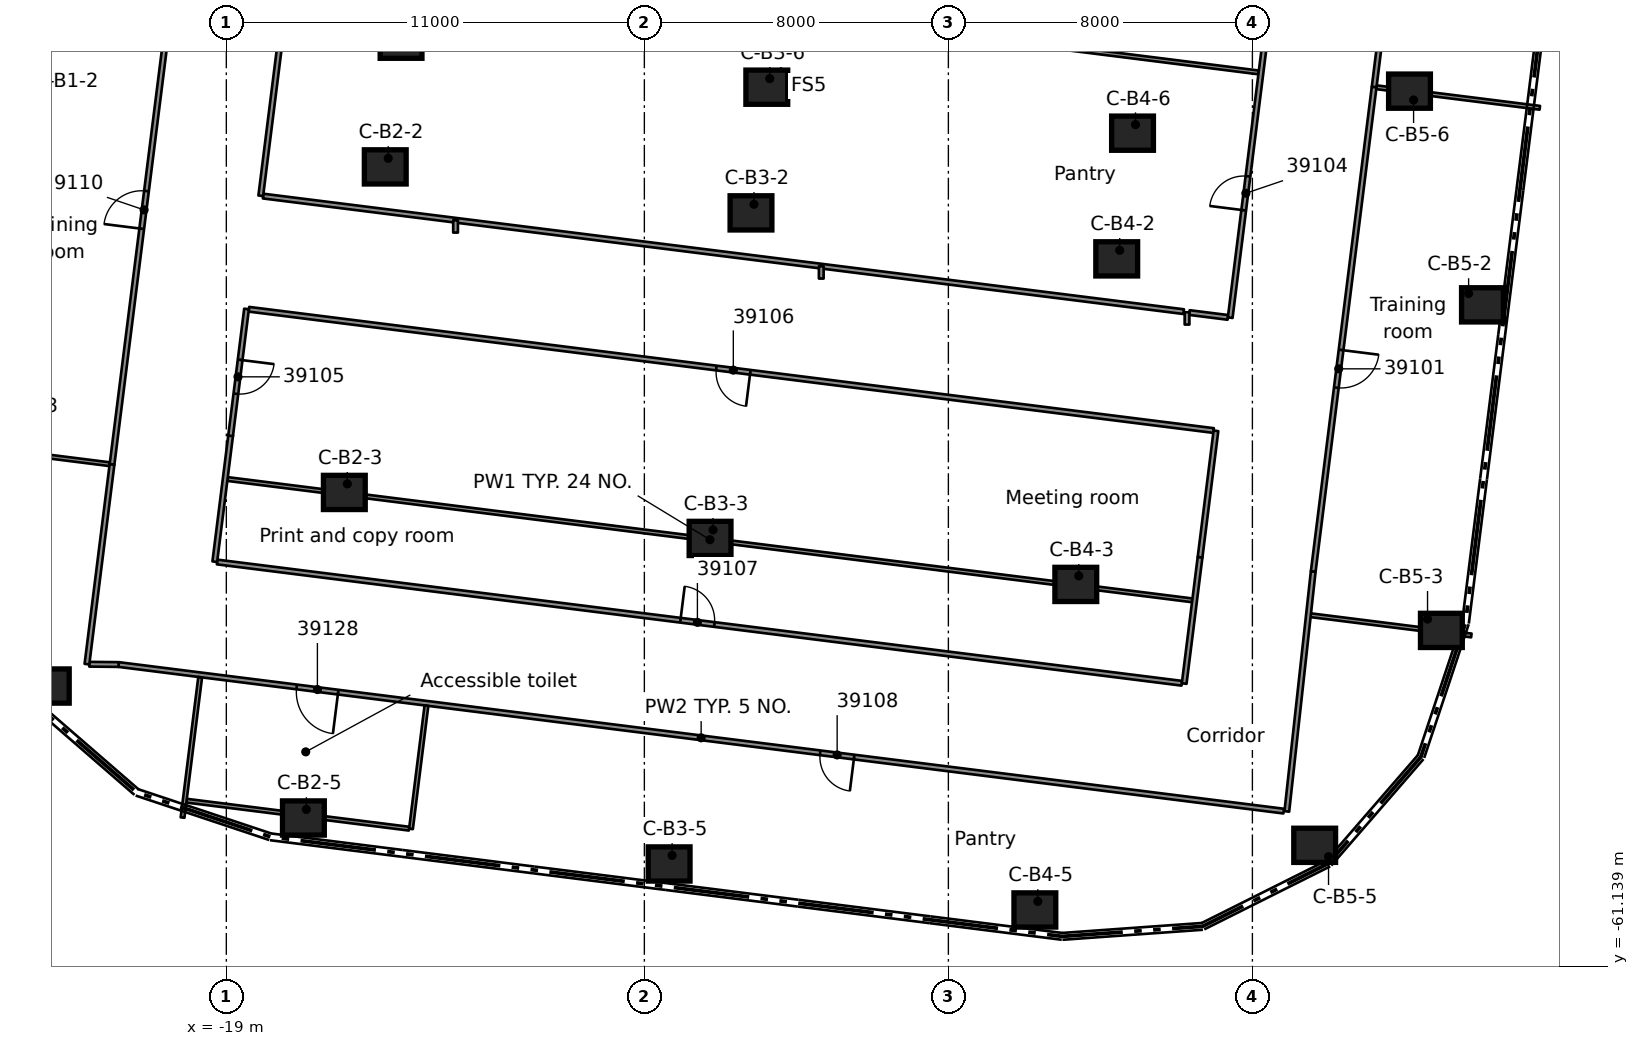
"""IFC4 building model, lengths in metres.
Left out: names, types, materials, properties, quantities, classifications, styles, units other than length and angle.
Written with IfcOpenShell. Run it as: python <this file> out.ifc"""

import sys

from ifc_helpers import new_model, si_unit, direction, frame, frame_2d, origin, origin_2d, place, context, subcontext, project, spatial, rectangle, extrude, element, fill, save


model = new_model("IFC4")
c1 = context("Model", 3, precision=1e-05, world=origin(), true_north=direction((0.0, 1.0)))
c2 = subcontext(c1, "Body", "Model", "MODEL_VIEW")
j1 = project(units=[si_unit("LENGTHUNIT", "METRE"), si_unit("PLANEANGLEUNIT", "RADIAN")], contexts=[c1])
p1 = place(None, origin())
s1 = spatial("IfcSite", under=j1, at=p1, CompositionType="ELEMENT")
p2 = place(p1, origin())
s2 = spatial("IfcBuilding", under=s1, at=p2, CompositionType="ELEMENT")
p3 = place(p2, frame((0.0, 0.0, 192.1)))
s3 = spatial("IfcBuildingStorey", under=s2, at=p3, CompositionType="ELEMENT", Elevation=192.1)
for number, where, z_axis, x_axis in (
    (1, (-23.685, -53.758, 0.0), (0.0, 0.0, 1.0), (1.0, 0.0, 0.0)),
    (2, (-14.818, -40.098, 0.0), (0.0, 0.0, 1.0), (1.0, 0.0, 0.0)),
    (3, (-15.895, -48.664, 0.0), (0.0, 0.0, 1.0), (1.0, 0.0, 0.0)),
    (4, (-16.972, -57.23, 0.0), (0.0, 0.0, 1.0), (1.0, 0.0, 0.0)),
    (5, (-14.402, -36.791, 0.0), (0.0, 0.0, 1.0), (1.0, 0.0, 0.0)),
    (6, (-5.194, -41.308, 0.0), (0.0, 0.0, 1.0), (1.0, 0.0, 0.0)),
    (7, (-6.271, -49.874, 0.0), (0.0, 0.0, 1.0), (1.0, 0.0, 0.0)),
    (8, (-7.348, -58.44, 0.0), (0.0, 0.0, 1.0), (1.0, 0.0, 0.0)),
    (9, (-4.778, -38.001, 0.0), (0.0, 0.0, 1.0), (1.0, 0.0, 0.0)),
    (10, (4.43, -42.518, 0.0), (0.0, 0.0, 1.0), (1.0, 0.0, 0.0)),
    (11, (3.353, -51.084, 0.0), (0.0, 0.0, 1.0), (1.0, 0.0, 0.0)),
    (12, (2.276, -59.65, 0.0), (0.0, 0.0, 1.0), (1.0, 0.0, 0.0)),
    (13, (4.846, -39.211, 0.0), (0.0, 0.0, 1.0), (1.0, 0.0, 0.0)),
    (14, (14.054, -43.728, 0.0), (0.0, 0.0, 1.0), (1.0, 0.0, 0.0)),
    (15, (12.973, -52.294, 0.0), (0.0, 0.0, 1.0), (1.0, 0.0, 0.0)),
    (16, (9.639, -57.949, 0.0), (0.0, 0.0, 1.0), (1.0, 0.0, 0.0)),
    (17, (12.134, -38.105, 0.0), (0.0, 0.0, 1.0), (1.0, 0.0, 0.0)),
):
    element("IfcColumn", number, at=place(p3, frame(where, z_axis=z_axis, x_axis=x_axis)), inside=s3, PredefinedType="COLUMN", context=c2, shape_type="SweptSolid", body=[
        extrude(rectangle(XDim=1.1, YDim=0.9, at=origin_2d()), origin(), (0.0, 0.0, 1.0), 3.5),
    ])
p4 = place(p3, frame((-20.045, -56.775, 0.0), z_axis=(0.0, 0.0, 1.0), x_axis=(0.992184639026, -0.124778371847, 0.0)))
e18 = element("IfcWall", 18, at=p4, inside=s3, PredefinedType="PARTITIONING", context=c2, shape_type="SweptSolid", body=[
    extrude(rectangle(XDim=5.899, YDim=0.1, at=frame_2d((2.95, 0.0))), origin(), (0.0, 0.0, 1.0), 3.06),
])
p5 = place(p3, frame((8.823, -57.049, 0.0), z_axis=(0.0, 0.0, 1.0), x_axis=(-0.992177755652, 0.124833093322, 0.0)))
e19 = element("IfcWall", 19, at=p5, inside=s3, PredefinedType="PARTITIONING", context=c2, shape_type="SweptSolid", body=[
    extrude(rectangle(XDim=30.899, YDim=0.125, at=frame_2d((15.449, 0.0))), origin(), (0.0, 0.0, 1.0), 3.06),
])
p6 = place(p5, frame((11.392, 0.0, 0.0)))
e20 = element("IfcOpeningElement", 20, at=p6, cuts=e19, PredefinedType="OPENING", context=c2, shape_type="SweptSolid", body=[
    extrude(rectangle(XDim=0.9, YDim=2.1, at=frame_2d((0.45, 1.05))), frame((0.0, 0.073, 0.0), z_axis=(0.0, -1.0, 0.0), x_axis=(1.0, 0.0, 0.0)), (0.0, 0.0, 1.0), 0.145),
])
p7 = place(p5, frame((25.077, 0.0, 0.0)))
e21 = element("IfcOpeningElement", 21, at=p7, cuts=e19, PredefinedType="OPENING", context=c2, shape_type="SweptSolid", body=[
    extrude(rectangle(XDim=1.1, YDim=2.1, at=frame_2d((0.55, 1.05))), frame((0.0, 0.073, 0.0), z_axis=(0.0, -1.0, 0.0), x_axis=(1.0, 0.0, 0.0)), (0.0, 0.0, 1.0), 0.145),
])
p8 = place(p3, frame((-19.242, -50.494, 0.0), z_axis=(0.0, 0.0, 1.0), x_axis=(0.992190871449, -0.124728804262, 0.0)))
e22 = element("IfcWall", 22, at=p8, inside=s3, PredefinedType="PARTITIONING", context=c2, shape_type="SweptSolid", body=[
    extrude(rectangle(XDim=25.585, YDim=0.125, at=frame_2d((12.792, 0.0))), origin(), (0.0, 0.0, 1.0), 3.06),
])
p9 = place(p8, frame((12.288, 0.0, 0.0)))
e23 = element("IfcOpeningElement", 23, at=p9, cuts=e22, PredefinedType="OPENING", context=c2, shape_type="SweptSolid", body=[
    extrude(rectangle(XDim=0.9, YDim=2.1, at=frame_2d((0.45, 1.05))), frame((0.0, 0.073, 0.0), z_axis=(0.0, -1.0, 0.0), x_axis=(1.0, 0.0, 0.0)), (0.0, 0.0, 1.0), 0.145),
])
p10 = place(p3, frame((-26.313, -47.387, 0.0), z_axis=(0.0, 0.0, 1.0), x_axis=(0.992174773364, -0.124856794369, 0.0)))
e24 = element("IfcWall", 24, at=p10, inside=s3, PredefinedType="PARTITIONING", context=c2, shape_type="SweptSolid", body=[
    extrude(rectangle(XDim=4.276, YDim=0.1, at=frame_2d((2.138, 0.0))), origin(), (0.0, 0.0, 1.0), 3.06),
])
p11 = place(p3, frame((-18.968, -48.311, 0.0), z_axis=(0.0, 0.0, 1.0), x_axis=(0.992187328306, -0.124756985971, 0.0)))
e25 = element("IfcWall", 25, at=p11, inside=s3, PredefinedType="PARTITIONING", context=c2, shape_type="SweptSolid", body=[
    extrude(rectangle(XDim=25.585, YDim=0.1, at=frame_2d((12.792, 0.0))), origin(), (0.0, 0.0, 1.0), 3.06),
])
p12 = place(p3, frame((9.519, -51.893, 0.0), z_axis=(0.0, 0.0, 1.0), x_axis=(0.992174773364, -0.124856794369, 0.0)))
e26 = element("IfcWall", 26, at=p12, inside=s3, PredefinedType="PARTITIONING", context=c2, shape_type="SweptSolid", body=[
    extrude(rectangle(XDim=4.276, YDim=0.1, at=frame_2d((2.138, 0.0))), origin(), (0.0, 0.0, 1.0), 3.06),
])
p13 = place(p3, frame((6.979, -47.035, 0.0), z_axis=(0.0, 0.0, 1.0), x_axis=(-0.992192052325, 0.124719410292, 0.0)))
e27 = element("IfcWall", 27, at=p13, inside=s3, PredefinedType="PARTITIONING", context=c2, shape_type="SweptSolid", body=[
    extrude(rectangle(XDim=25.585, YDim=0.125, at=frame_2d((12.792, 0.0))), origin(), (0.0, 0.0, 1.0), 3.06),
])
p14 = place(p13, frame((12.288, 0.0, 0.0)))
e28 = element("IfcOpeningElement", 28, at=p14, cuts=e27, PredefinedType="OPENING", context=c2, shape_type="SweptSolid", body=[
    extrude(rectangle(XDim=0.9, YDim=2.1, at=frame_2d((0.45, 1.05))), frame((0.0, 0.073, 0.0), z_axis=(0.0, -1.0, 0.0), x_axis=(1.0, 0.0, 0.0)), (0.0, 0.0, 1.0), 0.145),
])
p15 = place(p3, frame((-18.032, -40.866, 0.0), z_axis=(0.0, 0.0, 1.0), x_axis=(0.9922120451, -0.124560256738, 0.0)))
e29 = element("IfcWall", 29, at=p15, inside=s3, PredefinedType="PARTITIONING", context=c2, shape_type="SweptSolid", body=[
    extrude(rectangle(XDim=24.414, YDim=0.125, at=frame_2d((12.207, 0.0))), origin(), (0.0, 0.0, 1.0), 3.06),
])
p16 = place(p3, frame((6.342, -43.931, 0.0), z_axis=(0.0, 0.0, 1.0), x_axis=(0.992192944833, -0.124712309833, 0.0)))
e30 = element("IfcWall", 30, at=p16, inside=s3, PredefinedType="PARTITIONING", context=c2, shape_type="SweptSolid", body=[
    extrude(rectangle(XDim=1.02, YDim=0.125, at=frame_2d((0.51, 0.0))), origin(), (0.0, 0.0, 1.0), 3.06),
])
p17 = place(p3, frame((-17.221, -34.421, 0.0), z_axis=(0.0, 0.0, 1.0), x_axis=(0.992190871449, -0.124728804262, 0.0)))
e31 = element("IfcWall", 31, at=p17, inside=s3, PredefinedType="PARTITIONING", context=c2, shape_type="SweptSolid", body=[
    extrude(rectangle(XDim=25.585, YDim=0.1, at=frame_2d((12.792, 0.0))), origin(), (0.0, 0.0, 1.0), 3.06),
])
p18 = place(p3, frame((11.266, -38.003, 0.0), z_axis=(0.0, 0.0, 1.0), x_axis=(0.992194392082, -0.124700795187, 0.0)))
e32 = element("IfcWall", 32, at=p18, inside=s3, PredefinedType="PARTITIONING", context=c2, shape_type="SweptSolid", body=[
    extrude(rectangle(XDim=4.331, YDim=0.1, at=frame_2d((2.165, 0.0))), origin(), (0.0, 0.0, 1.0), 3.06),
])
p19 = place(p3, frame((-22.606, -53.184, 0.0), z_axis=(0.0, 0.0, 1.0), x_axis=(0.999948794941, -0.010119658899, 0.0)))
e33 = element("IfcWall", 33, at=p19, inside=s3, PredefinedType="PARTITIONING", context=c2, shape_type="SweptSolid", body=[
    extrude(rectangle(XDim=0.772, YDim=0.125, at=frame_2d((0.386, 0.0))), origin(), (0.0, 0.0, 1.0), 3.06),
])
p20 = place(p3, frame((9.601, -50.743, 0.0), z_axis=(0.0, 0.0, 1.0), x_axis=(-0.109423264463, -0.993995246062, 0.0)))
e34 = element("IfcWall", 34, at=p20, inside=s3, PredefinedType="PARTITIONING", context=c2, shape_type="SweptSolid", body=[
    extrude(rectangle(XDim=6.352, YDim=0.125, at=frame_2d((3.176, 0.0))), origin(), (0.0, 0.0, 1.0), 3.06),
])
p21 = place(p3, frame((11.204, -37.994, 0.0), z_axis=(0.0, 0.0, 1.0), x_axis=(-0.124754953573, -0.992187583856, 0.0)))
e35 = element("IfcWall", 35, at=p21, inside=s3, PredefinedType="PARTITIONING", context=c2, shape_type="SweptSolid", body=[
    extrude(rectangle(XDim=12.849, YDim=0.125, at=frame_2d((6.425, 0.0))), origin(), (0.0, 0.0, 1.0), 3.06),
])
p22 = place(p21, frame((6.976, 0.0, 0.0)))
e36 = element("IfcOpeningElement", 36, at=p22, cuts=e35, PredefinedType="OPENING", context=c2, shape_type="SweptSolid", body=[
    extrude(rectangle(XDim=1.0, YDim=2.1, at=frame_2d((0.5, 1.05))), frame((0.0, 0.073, 0.0), z_axis=(0.0, -1.0, 0.0), x_axis=(1.0, 0.0, 0.0)), (0.0, 0.0, 1.0), 0.145),
])
p23 = place(p3, frame((6.623, -50.368, 0.0), z_axis=(0.0, 0.0, 1.0), x_axis=(-0.124716116187, -0.992192466391, 0.0)))
e37 = element("IfcWall", 37, at=p23, inside=s3, PredefinedType="PARTITIONING", context=c2, shape_type="SweptSolid", body=[
    extrude(rectangle(XDim=3.351, YDim=0.125, at=frame_2d((1.676, 0.0))), origin(), (0.0, 0.0, 1.0), 3.06),
])
p24 = place(p3, frame((6.623, -50.368, 0.0), z_axis=(0.0, 0.0, 1.0), x_axis=(0.124725131243, 0.992191333179, 0.0)))
e38 = element("IfcWall", 38, at=p24, inside=s3, PredefinedType="PARTITIONING", context=c2, shape_type="SweptSolid", body=[
    extrude(rectangle(XDim=3.351, YDim=0.125, at=frame_2d((1.676, 0.0))), origin(), (0.0, 0.0, 1.0), 3.06),
])
p25 = place(p3, frame((7.416, -44.066, 0.0), z_axis=(0.0, 0.0, 1.0), x_axis=(0.124705364761, 0.992193817759, 0.0)))
e39 = element("IfcWall", 39, at=p25, inside=s3, PredefinedType="PARTITIONING", context=c2, shape_type="SweptSolid", body=[
    extrude(rectangle(XDim=11.739, YDim=0.125, at=frame_2d((5.869, 0.0))), origin(), (0.0, 0.0, 1.0), 3.06),
])
p26 = place(p25, frame((8.097, 0.0, 0.0)))
e40 = element("IfcOpeningElement", 40, at=p26, cuts=e39, PredefinedType="OPENING", context=c2, shape_type="SweptSolid", body=[
    extrude(rectangle(XDim=1.8, YDim=2.1, at=frame_2d((0.9, 1.05))), frame((0.0, 0.073, 0.0), z_axis=(0.0, -1.0, 0.0), x_axis=(1.0, 0.0, 0.0)), (0.0, 0.0, 1.0), 0.145),
])
p27 = place(p25, frame((2.85, 0.0, 0.0)))
e41 = element("IfcOpeningElement", 41, at=p27, cuts=e39, PredefinedType="OPENING", context=c2, shape_type="SweptSolid", body=[
    extrude(rectangle(XDim=0.9, YDim=2.1, at=frame_2d((0.45, 1.05))), frame((0.0, 0.073, 0.0), z_axis=(0.0, -1.0, 0.0), x_axis=(1.0, 0.0, 0.0)), (0.0, 0.0, 1.0), 0.145),
])
p28 = place(p3, frame((-14.141, -57.517, 0.0), z_axis=(0.0, 0.0, 1.0), x_axis=(0.124586287257, 0.992208776935, 0.0)))
e42 = element("IfcWall", 42, at=p28, inside=s3, PredefinedType="PARTITIONING", context=c2, shape_type="SweptSolid", body=[
    extrude(rectangle(XDim=3.269, YDim=0.1, at=frame_2d((1.634, 0.0))), origin(), (0.0, 0.0, 1.0), 3.06),
])
p29 = place(p3, frame((-18.884, -47.146, 0.0), z_axis=(0.0, 0.0, 1.0), x_axis=(-0.124739851626, -0.992189482617, 0.0)))
e43 = element("IfcWall", 43, at=p29, inside=s3, PredefinedType="PARTITIONING", context=c2, shape_type="SweptSolid", body=[
    extrude(rectangle(XDim=3.366, YDim=0.125, at=frame_2d((1.683, 0.0))), origin(), (0.0, 0.0, 1.0), 3.06),
])
p30 = place(p3, frame((-18.468, -43.836, 0.0), z_axis=(0.0, 0.0, 1.0), x_axis=(-0.124739851626, -0.992189482617, 0.0)))
e44 = element("IfcWall", 44, at=p30, inside=s3, PredefinedType="PARTITIONING", context=c2, shape_type="SweptSolid", body=[
    extrude(rectangle(XDim=3.366, YDim=0.125, at=frame_2d((1.683, 0.0))), origin(), (0.0, 0.0, 1.0), 3.06),
])
p31 = place(p30, frame((1.35, 0.0, 0.0)))
e45 = element("IfcOpeningElement", 45, at=p31, cuts=e44, PredefinedType="OPENING", context=c2, shape_type="SweptSolid", body=[
    extrude(rectangle(XDim=0.9, YDim=2.1, at=frame_2d((0.45, 1.05))), frame((0.0, 0.073, 0.0), z_axis=(0.0, -1.0, 0.0), x_axis=(1.0, 0.0, 0.0)), (0.0, 0.0, 1.0), 0.145),
])
p32 = place(p3, frame((-16.627, -29.199, 0.0), z_axis=(0.0, 0.0, 1.0), x_axis=(-0.124845291818, -0.992176220795, 0.0)))
e46 = element("IfcWall", 46, at=p32, inside=s3, PredefinedType="PARTITIONING", context=c2, shape_type="SweptSolid", body=[
    extrude(rectangle(XDim=11.751, YDim=0.125, at=frame_2d((5.875, 0.0))), origin(), (0.0, 0.0, 1.0), 3.06),
])
p33 = place(p32, frame((1.852, 0.0, 0.0)))
e47 = element("IfcOpeningElement", 47, at=p33, cuts=e46, PredefinedType="OPENING", context=c2, shape_type="SweptSolid", body=[
    extrude(rectangle(XDim=1.8, YDim=2.1, at=frame_2d((0.9, 1.05))), frame((0.0, 0.073, 0.0), z_axis=(0.0, -1.0, 0.0), x_axis=(1.0, 0.0, 0.0)), (0.0, 0.0, 1.0), 0.145),
])
p34 = place(p3, frame((-20.152, -57.219, 0.0), z_axis=(0.0, 0.0, 1.0), x_axis=(0.124656149898, 0.992200002163, 0.0)))
e48 = element("IfcWall", 48, at=p34, inside=s3, PredefinedType="PARTITIONING", context=c2, shape_type="SweptSolid", body=[
    extrude(rectangle(XDim=3.723, YDim=0.1, at=frame_2d((1.862, 0.0))), origin(), (0.0, 0.0, 1.0), 3.06),
])
p35 = place(p3, frame((-22.008, -47.929, 0.0), z_axis=(0.0, 0.0, 1.0), x_axis=(0.125040719406, 0.992151610637, 0.0)))
e49 = element("IfcWall", 49, at=p35, inside=s3, PredefinedType="PARTITIONING", context=c2, shape_type="SweptSolid", body=[
    extrude(rectangle(XDim=12.365, YDim=0.125, at=frame_2d((6.183, 0.0))), origin(), (0.0, 0.0, 1.0), 3.06),
])
p36 = place(p35, frame((6.252, 0.0, 0.0)))
e50 = element("IfcOpeningElement", 50, at=p36, cuts=e49, PredefinedType="OPENING", context=c2, shape_type="SweptSolid", body=[
    extrude(rectangle(XDim=1.0, YDim=2.1, at=frame_2d((0.5, 1.05))), frame((0.0, 0.073, 0.0), z_axis=(0.0, -1.0, 0.0), x_axis=(1.0, 0.0, 0.0)), (0.0, 0.0, 1.0), 0.145),
])
p37 = place(p3, frame((-22.008, -47.929, 0.0), z_axis=(0.0, 0.0, 1.0), x_axis=(-0.124647679963, -0.992201066256, 0.0)))
e51 = element("IfcWall", 51, at=p37, inside=s3, PredefinedType="PARTITIONING", context=c2, shape_type="SweptSolid", body=[
    extrude(rectangle(XDim=5.294, YDim=0.125, at=frame_2d((2.647, 0.0))), origin(), (0.0, 0.0, 1.0), 3.06),
])
p38 = place(p3, frame((11.204, -37.995, 0.0), z_axis=(0.0, 0.0, 1.0), x_axis=(0.124201089062, 0.992257068242, 0.0)))
e52 = element("IfcWall", 52, at=p38, inside=s3, PredefinedType="PARTITIONING", context=c2, shape_type="SweptSolid", body=[
    extrude(rectangle(XDim=1.626, YDim=0.125, at=frame_2d((0.813, 0.0))), origin(), (0.0, 0.0, 1.0), 3.06),
])
p39 = place(p3, frame((6.28, -44.247, 0.0), z_axis=(0.0, 0.0, 1.0), x_axis=(0.0, 1.0, 0.0)))
e53 = element("IfcWall", 53, at=p39, inside=s3, PredefinedType="PARTITIONING", context=c2, shape_type="SweptSolid", body=[
    extrude(rectangle(XDim=0.324, YDim=0.125, at=frame_2d((0.162, 0.0))), origin(), (0.0, 0.0, 1.0), 3.06),
])
p40 = place(p3, frame((-3.345, -43.037, 0.0), z_axis=(0.0, 0.0, 1.0), x_axis=(0.0, 1.0, 0.0)))
e54 = element("IfcWall", 54, at=p40, inside=s3, PredefinedType="PARTITIONING", context=c2, shape_type="SweptSolid", body=[
    extrude(rectangle(XDim=0.324, YDim=0.125, at=frame_2d((0.162, 0.0))), origin(), (0.0, 0.0, 1.0), 3.06),
])
p41 = place(p3, frame((-12.968, -41.827, 0.0), z_axis=(0.0, 0.0, 1.0), x_axis=(0.0, 1.0, 0.0)))
e55 = element("IfcWall", 55, at=p41, inside=s3, PredefinedType="PARTITIONING", context=c2, shape_type="SweptSolid", body=[
    extrude(rectangle(XDim=0.324, YDim=0.125, at=frame_2d((0.162, 0.0))), origin(), (0.0, 0.0, 1.0), 3.06),
])
p42 = place(p22, origin())
e56 = element("IfcDoor", 56, at=p42, inside=s3, OperationType="SINGLE_SWING_RIGHT", PredefinedType="DOOR", context=c2, shape_type="SweptSolid", body=[
    extrude(rectangle(XDim=1.0, YDim=2.1, at=frame_2d((0.5, 1.05))), frame((0.0, 0.025, 0.0), z_axis=(0.0, -1.0, 0.0), x_axis=(1.0, 0.0, 0.0)), (0.0, 0.0, 1.0), 0.05),
])
fill(e36, e56)
p43 = place(p27, origin())
e57 = element("IfcDoor", 57, at=p43, inside=s3, OperationType="SINGLE_SWING_LEFT", PredefinedType="DOOR", context=c2, shape_type="SweptSolid", body=[
    extrude(rectangle(XDim=0.9, YDim=2.1, at=frame_2d((0.45, 1.05))), frame((0.0, 0.025, 0.0), z_axis=(0.0, -1.0, 0.0), x_axis=(1.0, 0.0, 0.0)), (0.0, 0.0, 1.0), 0.05),
])
fill(e41, e57)
p44 = place(p31, origin())
e58 = element("IfcDoor", 58, at=p44, inside=s3, OperationType="SINGLE_SWING_RIGHT", PredefinedType="DOOR", context=c2, shape_type="SweptSolid", body=[
    extrude(rectangle(XDim=0.9, YDim=2.1, at=frame_2d((0.45, 1.05))), frame((0.0, 0.025, 0.0), z_axis=(0.0, -1.0, 0.0), x_axis=(1.0, 0.0, 0.0)), (0.0, 0.0, 1.0), 0.05),
])
fill(e45, e58)
p45 = place(p14, origin())
e59 = element("IfcDoor", 59, at=p45, inside=s3, OperationType="SINGLE_SWING_LEFT", PredefinedType="DOOR", context=c2, shape_type="SweptSolid", body=[
    extrude(rectangle(XDim=0.9, YDim=2.1, at=frame_2d((0.45, 1.05))), frame((0.0, 0.025, 0.0), z_axis=(0.0, -1.0, 0.0), x_axis=(1.0, 0.0, 0.0)), (0.0, 0.0, 1.0), 0.05),
])
fill(e28, e59)
p46 = place(p9, origin())
e60 = element("IfcDoor", 60, at=p46, inside=s3, OperationType="SINGLE_SWING_LEFT", PredefinedType="DOOR", context=c2, shape_type="SweptSolid", body=[
    extrude(rectangle(XDim=0.9, YDim=2.1, at=frame_2d((0.45, 1.05))), frame((0.0, 0.025, 0.0), z_axis=(0.0, -1.0, 0.0), x_axis=(1.0, 0.0, 0.0)), (0.0, 0.0, 1.0), 0.05),
])
fill(e23, e60)
p47 = place(p6, origin())
e61 = element("IfcDoor", 61, at=p47, inside=s3, OperationType="SINGLE_SWING_LEFT", PredefinedType="DOOR", context=c2, shape_type="SweptSolid", body=[
    extrude(rectangle(XDim=0.9, YDim=2.1, at=frame_2d((0.45, 1.05))), frame((0.0, 0.025, 0.0), z_axis=(0.0, -1.0, 0.0), x_axis=(1.0, 0.0, 0.0)), (0.0, 0.0, 1.0), 0.05),
])
fill(e20, e61)
p48 = place(p36, origin())
e62 = element("IfcDoor", 62, at=p48, inside=s3, OperationType="SINGLE_SWING_RIGHT", PredefinedType="DOOR", context=c2, shape_type="SweptSolid", body=[
    extrude(rectangle(XDim=1.0, YDim=2.1, at=frame_2d((0.5, 1.05))), frame((0.0, 0.025, 0.0), z_axis=(0.0, -1.0, 0.0), x_axis=(1.0, 0.0, 0.0)), (0.0, 0.0, 1.0), 0.05),
])
fill(e50, e62)
p49 = place(p7, origin())
e63 = element("IfcDoor", 63, at=p49, inside=s3, OperationType="SINGLE_SWING_RIGHT", PredefinedType="DOOR", context=c2, shape_type="SweptSolid", body=[
    extrude(rectangle(XDim=1.1, YDim=2.1, at=frame_2d((0.55, 1.05))), frame((0.0, 0.025, 0.0), z_axis=(0.0, -1.0, 0.0), x_axis=(1.0, 0.0, 0.0)), (0.0, 0.0, 1.0), 0.05),
])
fill(e21, e63)
save(model, sys.argv[1])
